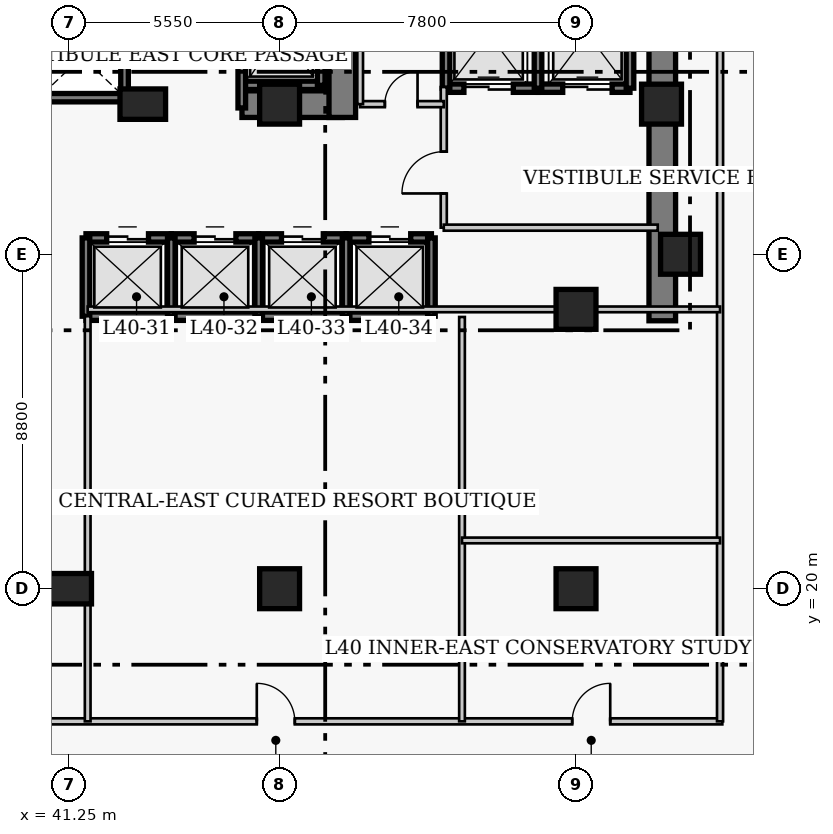
"""IFC4 building model, lengths in metres.
Left out: names, types, materials, properties, quantities, classifications, styles, units other than length and angle.
Written with IfcOpenShell. Run it as: python <this file> out.ifc"""

import sys

from ifc_helpers import new_model, si_unit, direction, frame, frame_2d, origin, origin_2d, place, context, subcontext, project, spatial, rectangle, extrude, element, fill, save


model = new_model("IFC4")
c1 = context("Model", 3, precision=1e-05, world=origin(), true_north=direction((0.0, 1.0)))
c2 = subcontext(c1, "Body", "Model", "MODEL_VIEW")
j1 = project(units=[si_unit("LENGTHUNIT", "METRE"), si_unit("PLANEANGLEUNIT", "RADIAN")], contexts=[c1])
p1 = place(None, origin())
s1 = spatial("IfcSite", under=j1, at=p1, CompositionType="ELEMENT")
p2 = place(p1, origin())
s2 = spatial("IfcBuilding", under=s1, at=p2, CompositionType="ELEMENT")
p3 = place(p2, frame((0.0, 0.0, 161.2)))
s3 = spatial("IfcBuildingStorey", under=s2, at=p3, CompositionType="ELEMENT", Elevation=161.2)
p4 = place(p3, frame((56.87, 27.05, 0.0), z_axis=(0.0, 0.0, 1.0), x_axis=(0.0, 1.0, 0.0)))
e1 = element("IfcWall", 1, at=p4, inside=s3, PredefinedType="SHEAR", context=c2, shape_type="SweptSolid", body=[
    extrude(rectangle(XDim=13.62, YDim=0.7, at=frame_2d((6.81, 0.0))), origin(), (0.0, 0.0, 1.0), 3.8),
])
p5 = place(p3, frame((45.81, 32.75, 0.0), z_axis=(0.0, 0.0, 1.0), x_axis=(1.0, 0.0, 0.0)))
e2 = element("IfcWall", 2, at=p5, inside=s3, PredefinedType="SHEAR", context=c2, shape_type="SweptSolid", body=[
    extrude(rectangle(XDim=2.64, YDim=0.7, at=frame_2d((1.32, 0.0))), origin(), (0.0, 0.0, 1.0), 3.8),
])
p6 = place(p3, frame((48.45, 32.4, 0.0), z_axis=(0.0, 0.0, 1.0), x_axis=(0.0, 1.0, 0.0)))
e3 = element("IfcWall", 3, at=p6, inside=s3, PredefinedType="SHEAR", context=c2, shape_type="SweptSolid", body=[
    extrude(rectangle(XDim=7.92, YDim=0.7, at=frame_2d((3.96, 0.0))), origin(), (0.0, 0.0, 1.0), 3.8),
])
p7 = place(p6, frame((5.8, 0.0, 0.0)))
e4 = element("IfcOpeningElement", 4, at=p7, cuts=e3, PredefinedType="OPENING", context=c2, shape_type="SweptSolid", body=[
    extrude(rectangle(XDim=1.1, YDim=2.15, at=frame_2d((0.55, 1.075))), frame((0.0, 0.36, 0.0), z_axis=(0.0, -1.0, 0.0), x_axis=(1.0, 0.0, 0.0)), (0.0, 0.0, 1.0), 0.72),
])
p8 = place(p3, frame((41.25, 20.0, 0.0), z_axis=(0.0, 0.0, 1.0), x_axis=(1.0, 0.0, 0.0)))
e5 = element("IfcColumn", 5, at=p8, inside=s3, PredefinedType="COLUMN", context=c2, shape_type="SweptSolid", body=[
    extrude(rectangle(XDim=1.2, YDim=0.8, at=origin_2d()), origin(), (0.0, 0.0, 1.0), 3.8),
])
for number, where, z_axis, x_axis in (
    (6, (46.8, 20.0, 0.0), (0.0, 0.0, 1.0), (1.0, 0.0, 0.0)),
    (7, (54.6, 20.0, 0.0), (0.0, 0.0, 1.0), (1.0, 0.0, 0.0)),
    (8, (57.35, 28.8, 0.0), (0.0, 0.0, 1.0), (1.0, 0.0, 0.0)),
):
    element("IfcColumn", number, at=place(p3, frame(where, z_axis=z_axis, x_axis=x_axis)), inside=s3, PredefinedType="COLUMN", context=c2, shape_type="SweptSolid", body=[
        extrude(rectangle(XDim=1.05, YDim=1.05, at=origin_2d()), origin(), (0.0, 0.0, 1.0), 3.8),
    ])
p9 = place(p3, frame((43.2, 32.75, 0.0), z_axis=(0.0, 0.0, 1.0), x_axis=(1.0, 0.0, 0.0)))
e9 = element("IfcColumn", 9, at=p9, inside=s3, PredefinedType="COLUMN", context=c2, shape_type="SweptSolid", body=[
    extrude(rectangle(XDim=1.2, YDim=0.8, at=origin_2d()), origin(), (0.0, 0.0, 1.0), 3.8),
])
for number, where, z_axis, x_axis in (
    (10, (46.8, 32.75, 0.0), (0.0, 0.0, 1.0), (1.0, 0.0, 0.0)),
    (11, (54.6, 27.35, 0.0), (0.0, 0.0, 1.0), (1.0, 0.0, 0.0)),
    (12, (56.85, 32.75, 0.0), (0.0, 0.0, 1.0), (1.0, 0.0, 0.0)),
):
    element("IfcColumn", number, at=place(p3, frame(where, z_axis=z_axis, x_axis=x_axis)), inside=s3, PredefinedType="COLUMN", context=c2, shape_type="SweptSolid", body=[
        extrude(rectangle(XDim=1.05, YDim=1.05, at=origin_2d()), origin(), (0.0, 0.0, 1.0), 3.8),
    ])
p10 = place(p3, frame((41.705, 29.23, 0.0), z_axis=(0.0, 0.0, 1.0), x_axis=(1.0, 0.0, 0.0)))
e13 = element("IfcWall", 13, at=p10, inside=s3, PredefinedType="SHEAR", context=c2, shape_type="SweptSolid", body=[
    extrude(rectangle(XDim=2.245, YDim=0.22, at=frame_2d((1.123, 0.0))), origin(), (0.0, 0.0, 1.0), 3.8),
])
p11 = place(p10, frame((0.545, 0.0, 0.0)))
e14 = element("IfcOpeningElement", 14, at=p11, cuts=e13, PredefinedType="OPENING", context=c2, shape_type="SweptSolid", body=[
    extrude(rectangle(XDim=1.1, YDim=2.15, at=frame_2d((0.55, 1.075))), frame((0.0, 0.12, 0.0), z_axis=(0.0, -1.0, 0.0), x_axis=(1.0, 0.0, 0.0)), (0.0, 0.0, 1.0), 0.24),
])
p12 = place(p3, frame((41.705, 27.17, 0.0), z_axis=(0.0, 0.0, 1.0), x_axis=(1.0, 0.0, 0.0)))
e15 = element("IfcWall", 15, at=p12, inside=s3, PredefinedType="SHEAR", context=c2, shape_type="SweptSolid", body=[
    extrude(rectangle(XDim=2.245, YDim=0.22, at=frame_2d((1.123, 0.0))), origin(), (0.0, 0.0, 1.0), 3.8),
])
p13 = place(p3, frame((41.705, 27.17, 0.0), z_axis=(0.0, 0.0, 1.0), x_axis=(0.0, 1.0, 0.0)))
e16 = element("IfcWall", 16, at=p13, inside=s3, PredefinedType="SHEAR", context=c2, shape_type="SweptSolid", body=[
    extrude(rectangle(XDim=2.06, YDim=0.2, at=frame_2d((1.03, 0.0))), origin(), (0.0, 0.0, 1.0), 3.8),
])
p14 = place(p3, frame((43.95, 29.23, 0.0), z_axis=(0.0, 0.0, 1.0), x_axis=(1.0, 0.0, 0.0)))
e17 = element("IfcWall", 17, at=p14, inside=s3, PredefinedType="SHEAR", context=c2, shape_type="SweptSolid", body=[
    extrude(rectangle(XDim=2.3, YDim=0.22, at=frame_2d((1.15, 0.0))), origin(), (0.0, 0.0, 1.0), 3.8),
])
p15 = place(p14, frame((0.6, 0.0, 0.0)))
e18 = element("IfcOpeningElement", 18, at=p15, cuts=e17, PredefinedType="OPENING", context=c2, shape_type="SweptSolid", body=[
    extrude(rectangle(XDim=1.1, YDim=2.15, at=frame_2d((0.55, 1.075))), frame((0.0, 0.12, 0.0), z_axis=(0.0, -1.0, 0.0), x_axis=(1.0, 0.0, 0.0)), (0.0, 0.0, 1.0), 0.24),
])
p16 = place(p3, frame((43.95, 27.17, 0.0), z_axis=(0.0, 0.0, 1.0), x_axis=(1.0, 0.0, 0.0)))
e19 = element("IfcWall", 19, at=p16, inside=s3, PredefinedType="SHEAR", context=c2, shape_type="SweptSolid", body=[
    extrude(rectangle(XDim=2.3, YDim=0.22, at=frame_2d((1.15, 0.0))), origin(), (0.0, 0.0, 1.0), 3.8),
])
p17 = place(p3, frame((43.95, 27.17, 0.0), z_axis=(0.0, 0.0, 1.0), x_axis=(0.0, 1.0, 0.0)))
e20 = element("IfcWall", 20, at=p17, inside=s3, PredefinedType="SHEAR", context=c2, shape_type="SweptSolid", body=[
    extrude(rectangle(XDim=2.06, YDim=0.2, at=frame_2d((1.03, 0.0))), origin(), (0.0, 0.0, 1.0), 3.8),
])
p18 = place(p3, frame((46.25, 29.23, 0.0), z_axis=(0.0, 0.0, 1.0), x_axis=(1.0, 0.0, 0.0)))
e21 = element("IfcWall", 21, at=p18, inside=s3, PredefinedType="SHEAR", context=c2, shape_type="SweptSolid", body=[
    extrude(rectangle(XDim=2.3, YDim=0.22, at=frame_2d((1.15, 0.0))), origin(), (0.0, 0.0, 1.0), 3.8),
])
p19 = place(p18, frame((0.6, 0.0, 0.0)))
e22 = element("IfcOpeningElement", 22, at=p19, cuts=e21, PredefinedType="OPENING", context=c2, shape_type="SweptSolid", body=[
    extrude(rectangle(XDim=1.1, YDim=2.15, at=frame_2d((0.55, 1.075))), frame((0.0, 0.12, 0.0), z_axis=(0.0, -1.0, 0.0), x_axis=(1.0, 0.0, 0.0)), (0.0, 0.0, 1.0), 0.24),
])
p20 = place(p3, frame((46.25, 27.17, 0.0), z_axis=(0.0, 0.0, 1.0), x_axis=(1.0, 0.0, 0.0)))
e23 = element("IfcWall", 23, at=p20, inside=s3, PredefinedType="SHEAR", context=c2, shape_type="SweptSolid", body=[
    extrude(rectangle(XDim=2.3, YDim=0.22, at=frame_2d((1.15, 0.0))), origin(), (0.0, 0.0, 1.0), 3.8),
])
p21 = place(p3, frame((46.25, 27.17, 0.0), z_axis=(0.0, 0.0, 1.0), x_axis=(0.0, 1.0, 0.0)))
e24 = element("IfcWall", 24, at=p21, inside=s3, PredefinedType="SHEAR", context=c2, shape_type="SweptSolid", body=[
    extrude(rectangle(XDim=2.06, YDim=0.2, at=frame_2d((1.03, 0.0))), origin(), (0.0, 0.0, 1.0), 3.8),
])
p22 = place(p3, frame((48.55, 29.23, 0.0), z_axis=(0.0, 0.0, 1.0), x_axis=(1.0, 0.0, 0.0)))
e25 = element("IfcWall", 25, at=p22, inside=s3, PredefinedType="SHEAR", context=c2, shape_type="SweptSolid", body=[
    extrude(rectangle(XDim=2.245, YDim=0.22, at=frame_2d((1.123, 0.0))), origin(), (0.0, 0.0, 1.0), 3.8),
])
p23 = place(p22, frame((0.6, 0.0, 0.0)))
e26 = element("IfcOpeningElement", 26, at=p23, cuts=e25, PredefinedType="OPENING", context=c2, shape_type="SweptSolid", body=[
    extrude(rectangle(XDim=1.1, YDim=2.15, at=frame_2d((0.55, 1.075))), frame((0.0, 0.12, 0.0), z_axis=(0.0, -1.0, 0.0), x_axis=(1.0, 0.0, 0.0)), (0.0, 0.0, 1.0), 0.24),
])
p24 = place(p3, frame((48.55, 27.17, 0.0), z_axis=(0.0, 0.0, 1.0), x_axis=(1.0, 0.0, 0.0)))
e27 = element("IfcWall", 27, at=p24, inside=s3, PredefinedType="SHEAR", context=c2, shape_type="SweptSolid", body=[
    extrude(rectangle(XDim=2.245, YDim=0.22, at=frame_2d((1.123, 0.0))), origin(), (0.0, 0.0, 1.0), 3.8),
])
for number, where, z_axis, x_axis in (
    (28, (48.55, 27.17, 0.0), (0.0, 0.0, 1.0), (0.0, 1.0, 0.0)),
    (29, (50.795, 27.17, 0.0), (0.0, 0.0, 1.0), (0.0, 1.0, 0.0)),
):
    element("IfcWall", number, at=place(p3, frame(where, z_axis=z_axis, x_axis=x_axis)), inside=s3, PredefinedType="SHEAR", context=c2, shape_type="SweptSolid", body=[
        extrude(rectangle(XDim=2.06, YDim=0.2, at=frame_2d((1.03, 0.0))), origin(), (0.0, 0.0, 1.0), 3.8),
    ])
p25 = place(p3, frame((40.4, 32.92, 0.0), z_axis=(0.0, 0.0, 1.0), x_axis=(1.0, 0.0, 0.0)))
e30 = element("IfcWall", 30, at=p25, inside=s3, PredefinedType="SHEAR", context=c2, shape_type="SweptSolid", body=[
    extrude(rectangle(XDim=2.32, YDim=0.22, at=frame_2d((1.16, 0.0))), origin(), (0.0, 0.0, 1.0), 3.8),
])
p26 = place(p3, frame((42.72, 32.92, 0.0), z_axis=(0.0, 0.0, 1.0), x_axis=(0.0, 1.0, 0.0)))
e31 = element("IfcWall", 31, at=p26, inside=s3, PredefinedType="SHEAR", context=c2, shape_type="SweptSolid", body=[
    extrude(rectangle(XDim=2.16, YDim=0.2, at=frame_2d((1.08, 0.0))), origin(), (0.0, 0.0, 1.0), 3.8),
])
p27 = place(p3, frame((51.18, 33.17, 0.0), z_axis=(0.0, 0.0, 1.0), x_axis=(1.0, 0.0, 0.0)))
e32 = element("IfcWall", 32, at=p27, inside=s3, PredefinedType="SHEAR", context=c2, shape_type="SweptSolid", body=[
    extrude(rectangle(XDim=2.42, YDim=0.22, at=frame_2d((1.21, 0.0))), origin(), (0.0, 0.0, 1.0), 3.8),
])
p28 = place(p27, frame((0.47, 0.0, 0.0)))
e33 = element("IfcOpeningElement", 33, at=p28, cuts=e32, PredefinedType="OPENING", context=c2, shape_type="SweptSolid", body=[
    extrude(rectangle(XDim=1.3, YDim=2.15, at=frame_2d((0.65, 1.075))), frame((0.0, 0.12, 0.0), z_axis=(0.0, -1.0, 0.0), x_axis=(1.0, 0.0, 0.0)), (0.0, 0.0, 1.0), 0.24),
])
p29 = place(p3, frame((51.18, 33.17, 0.0), z_axis=(0.0, 0.0, 1.0), x_axis=(0.0, 1.0, 0.0)))
e34 = element("IfcWall", 34, at=p29, inside=s3, PredefinedType="SHEAR", context=c2, shape_type="SweptSolid", body=[
    extrude(rectangle(XDim=2.86, YDim=0.2, at=frame_2d((1.43, 0.0))), origin(), (0.0, 0.0, 1.0), 3.8),
])
p30 = place(p3, frame((53.6, 33.17, 0.0), z_axis=(0.0, 0.0, 1.0), x_axis=(1.0, 0.0, 0.0)))
e35 = element("IfcWall", 35, at=p30, inside=s3, PredefinedType="SHEAR", context=c2, shape_type="SweptSolid", body=[
    extrude(rectangle(XDim=2.42, YDim=0.22, at=frame_2d((1.21, 0.0))), origin(), (0.0, 0.0, 1.0), 3.8),
])
p31 = place(p30, frame((0.65, 0.0, 0.0)))
e36 = element("IfcOpeningElement", 36, at=p31, cuts=e35, PredefinedType="OPENING", context=c2, shape_type="SweptSolid", body=[
    extrude(rectangle(XDim=1.3, YDim=2.15, at=frame_2d((0.65, 1.075))), frame((0.0, 0.12, 0.0), z_axis=(0.0, -1.0, 0.0), x_axis=(1.0, 0.0, 0.0)), (0.0, 0.0, 1.0), 0.24),
])
for number, where, z_axis, x_axis in (
    (37, (53.6, 33.17, 0.0), (0.0, 0.0, 1.0), (0.0, 1.0, 0.0)),
    (38, (56.02, 33.17, 0.0), (0.0, 0.0, 1.0), (0.0, 1.0, 0.0)),
):
    element("IfcWall", number, at=place(p3, frame(where, z_axis=z_axis, x_axis=x_axis)), inside=s3, PredefinedType="SHEAR", context=c2, shape_type="SweptSolid", body=[
        extrude(rectangle(XDim=2.86, YDim=0.2, at=frame_2d((1.43, 0.0))), origin(), (0.0, 0.0, 1.0), 3.8),
    ])
p32 = place(p3, frame((45.805, 33.245, 0.0), z_axis=(0.0, 0.0, 1.0), x_axis=(1.0, 0.0, 0.0)))
e39 = element("IfcWall", 39, at=p32, inside=s3, PredefinedType="SHEAR", context=c2, shape_type="SweptSolid", body=[
    extrude(rectangle(XDim=2.09, YDim=0.22, at=frame_2d((1.045, 0.0))), origin(), (0.0, 0.0, 1.0), 3.8),
])
p33 = place(p3, frame((45.805, 32.65, 0.0), z_axis=(0.0, 0.0, 1.0), x_axis=(0.0, 1.0, 0.0)))
e40 = element("IfcWall", 40, at=p33, inside=s3, PredefinedType="SHEAR", context=c2, shape_type="SweptSolid", body=[
    extrude(rectangle(XDim=3.505, YDim=0.2, at=frame_2d((1.752, 0.0))), origin(), (0.0, 0.0, 1.0), 3.8),
])
p34 = place(p3, frame((47.895, 33.245, 0.0), z_axis=(0.0, 0.0, 1.0), x_axis=(0.0, 1.0, 0.0)))
e41 = element("IfcWall", 41, at=p34, inside=s3, PredefinedType="SHEAR", context=c2, shape_type="SweptSolid", body=[
    extrude(rectangle(XDim=2.91, YDim=0.2, at=frame_2d((1.455, 0.0))), origin(), (0.0, 0.0, 1.0), 3.8),
])
p35 = place(p3, frame((51.12, 29.5, 0.0), z_axis=(0.0, 0.0, 1.0), x_axis=(0.0, 1.0, 0.0)))
e42 = element("IfcWall", 42, at=p35, inside=s3, PredefinedType="PARTITIONING", context=c2, shape_type="SweptSolid", body=[
    extrude(rectangle(XDim=3.7, YDim=0.16, at=frame_2d((1.85, 0.0))), origin(), (0.0, 0.0, 1.0), 3.55),
])
p36 = place(p35, frame((0.9, 0.0, 0.0)))
e43 = element("IfcOpeningElement", 43, at=p36, cuts=e42, PredefinedType="OPENING", context=c2, shape_type="SweptSolid", body=[
    extrude(rectangle(XDim=1.1, YDim=2.15, at=frame_2d((0.55, 1.075))), frame((0.0, 0.09, 0.0), z_axis=(0.0, -1.0, 0.0), x_axis=(1.0, 0.0, 0.0)), (0.0, 0.0, 1.0), 0.18),
])
p37 = place(p3, frame((51.12, 29.5, 0.0), z_axis=(0.0, 0.0, 1.0), x_axis=(1.0, 0.0, 0.0)))
e44 = element("IfcWall", 44, at=p37, inside=s3, PredefinedType="PARTITIONING", context=c2, shape_type="SweptSolid", body=[
    extrude(rectangle(XDim=5.63, YDim=0.16, at=frame_2d((2.815, 0.0))), origin(), (0.0, 0.0, 1.0), 3.55),
])
p38 = place(p3, frame((48.92, 32.75, 0.0), z_axis=(0.0, 0.0, 1.0), x_axis=(1.0, 0.0, 0.0)))
e45 = element("IfcWall", 45, at=p38, inside=s3, PredefinedType="PARTITIONING", context=c2, shape_type="SweptSolid", body=[
    extrude(rectangle(XDim=2.2, YDim=0.16, at=frame_2d((1.1, 0.0))), origin(), (0.0, 0.0, 1.0), 3.55),
])
p39 = place(p38, frame((0.65, 0.0, 0.0)))
e46 = element("IfcOpeningElement", 46, at=p39, cuts=e45, PredefinedType="OPENING", context=c2, shape_type="SweptSolid", body=[
    extrude(rectangle(XDim=0.86, YDim=2.05, at=frame_2d((0.43, 1.025))), frame((0.0, 0.09, 0.0), z_axis=(0.0, -1.0, 0.0), x_axis=(1.0, 0.0, 0.0)), (0.0, 0.0, 1.0), 0.18),
])
p40 = place(p3, frame((48.92, 32.75, 0.0), z_axis=(0.0, 0.0, 1.0), x_axis=(0.0, 1.0, 0.0)))
e47 = element("IfcWall", 47, at=p40, inside=s3, PredefinedType="PARTITIONING", context=c2, shape_type="SweptSolid", body=[
    extrude(rectangle(XDim=3.62, YDim=0.15, at=frame_2d((1.81, 0.0))), origin(), (0.0, 0.0, 1.0), 3.55),
])
p41 = place(p3, frame((35.85, 16.51, 0.0), z_axis=(0.0, 0.0, 1.0), x_axis=(1.0, 0.0, 0.0)))
e48 = element("IfcWall", 48, at=p41, inside=s3, PredefinedType="PARTITIONING", context=c2, shape_type="SweptSolid", body=[
    extrude(rectangle(XDim=22.6, YDim=0.16, at=frame_2d((11.3, 0.0))), origin(), (0.0, 0.0, 1.0), 3.55),
])
p42 = place(p41, frame((10.35, 0.0, 0.0)))
e49 = element("IfcOpeningElement", 49, at=p42, cuts=e48, PredefinedType="OPENING", context=c2, shape_type="SweptSolid", body=[
    extrude(rectangle(XDim=1.0, YDim=2.15, at=frame_2d((0.5, 1.075))), frame((0.0, 0.09, 0.0), z_axis=(0.0, -1.0, 0.0), x_axis=(1.0, 0.0, 0.0)), (0.0, 0.0, 1.0), 0.18),
])
p43 = place(p41, frame((18.65, 0.0, 0.0)))
e50 = element("IfcOpeningElement", 50, at=p43, cuts=e48, PredefinedType="OPENING", context=c2, shape_type="SweptSolid", body=[
    extrude(rectangle(XDim=1.0, YDim=2.15, at=frame_2d((0.5, 1.075))), frame((0.0, 0.09, 0.0), z_axis=(0.0, -1.0, 0.0), x_axis=(1.0, 0.0, 0.0)), (0.0, 0.0, 1.0), 0.18),
])
p44 = place(p3, frame((58.39, 16.51, 0.0), z_axis=(0.0, 0.0, 1.0), x_axis=(0.0, 1.0, 0.0)))
e51 = element("IfcWall", 51, at=p44, inside=s3, PredefinedType="PARTITIONING", context=c2, shape_type="SweptSolid", body=[
    extrude(rectangle(XDim=24.14, YDim=0.16, at=frame_2d((12.07, 0.0))), origin(), (0.0, 0.0, 1.0), 3.093),
])
p45 = place(p3, frame((41.75, 16.51, 0.0), z_axis=(0.0, 0.0, 1.0), x_axis=(0.0, 1.0, 0.0)))
e52 = element("IfcWall", 52, at=p45, inside=s3, PredefinedType="PARTITIONING", context=c2, shape_type="SweptSolid", body=[
    extrude(rectangle(XDim=10.66, YDim=0.15, at=frame_2d((5.33, 0.0))), origin(), (0.0, 0.0, 1.0), 3.55),
])
p46 = place(p3, frame((51.6, 16.51, 0.0), z_axis=(0.0, 0.0, 1.0), x_axis=(0.0, 1.0, 0.0)))
e53 = element("IfcWall", 53, at=p46, inside=s3, PredefinedType="PARTITIONING", context=c2, shape_type="SweptSolid", body=[
    extrude(rectangle(XDim=10.64, YDim=0.15, at=frame_2d((5.32, 0.0))), origin(), (0.0, 0.0, 1.0), 3.55),
])
p47 = place(p3, frame((41.75, 27.35, 0.0), z_axis=(0.0, 0.0, 1.0), x_axis=(1.0, 0.0, 0.0)))
e54 = element("IfcWall", 54, at=p47, inside=s3, PredefinedType="PARTITIONING", context=c2, shape_type="SweptSolid", body=[
    extrude(rectangle(XDim=16.64, YDim=0.15, at=frame_2d((8.32, 0.0))), origin(), (0.0, 0.0, 1.0), 3.55),
])
p48 = place(p3, frame((51.6, 21.27, 0.0), z_axis=(0.0, 0.0, 1.0), x_axis=(1.0, 0.0, 0.0)))
e55 = element("IfcWall", 55, at=p48, inside=s3, PredefinedType="PARTITIONING", context=c2, shape_type="SweptSolid", body=[
    extrude(rectangle(XDim=6.79, YDim=0.15, at=frame_2d((3.395, 0.0))), origin(), (0.0, 0.0, 1.0), 3.55),
])
p49 = place(p11, origin())
e56 = element("IfcDoor", 56, at=p49, inside=s3, OperationType="DOUBLE_DOOR_SLIDING", PredefinedType="DOOR", context=c2, shape_type="SweptSolid", body=[
    extrude(rectangle(XDim=1.1, YDim=2.15, at=frame_2d((0.55, 1.075))), frame((0.0, 0.025, 0.0), z_axis=(0.0, -1.0, 0.0), x_axis=(1.0, 0.0, 0.0)), (0.0, 0.0, 1.0), 0.05),
])
fill(e14, e56)
p50 = place(p15, origin())
e57 = element("IfcDoor", 57, at=p50, inside=s3, OperationType="DOUBLE_DOOR_SLIDING", PredefinedType="DOOR", context=c2, shape_type="SweptSolid", body=[
    extrude(rectangle(XDim=1.1, YDim=2.15, at=frame_2d((0.55, 1.075))), frame((0.0, 0.025, 0.0), z_axis=(0.0, -1.0, 0.0), x_axis=(1.0, 0.0, 0.0)), (0.0, 0.0, 1.0), 0.05),
])
fill(e18, e57)
p51 = place(p19, origin())
e58 = element("IfcDoor", 58, at=p51, inside=s3, OperationType="DOUBLE_DOOR_SLIDING", PredefinedType="DOOR", context=c2, shape_type="SweptSolid", body=[
    extrude(rectangle(XDim=1.1, YDim=2.15, at=frame_2d((0.55, 1.075))), frame((0.0, 0.025, 0.0), z_axis=(0.0, -1.0, 0.0), x_axis=(1.0, 0.0, 0.0)), (0.0, 0.0, 1.0), 0.05),
])
fill(e22, e58)
p52 = place(p23, origin())
e59 = element("IfcDoor", 59, at=p52, inside=s3, OperationType="DOUBLE_DOOR_SLIDING", PredefinedType="DOOR", context=c2, shape_type="SweptSolid", body=[
    extrude(rectangle(XDim=1.1, YDim=2.15, at=frame_2d((0.55, 1.075))), frame((0.0, 0.025, 0.0), z_axis=(0.0, -1.0, 0.0), x_axis=(1.0, 0.0, 0.0)), (0.0, 0.0, 1.0), 0.05),
])
fill(e26, e59)
p53 = place(p28, origin())
e60 = element("IfcDoor", 60, at=p53, inside=s3, OperationType="DOUBLE_DOOR_SLIDING", PredefinedType="DOOR", context=c2, shape_type="SweptSolid", body=[
    extrude(rectangle(XDim=1.3, YDim=2.15, at=frame_2d((0.65, 1.075))), frame((0.0, 0.025, 0.0), z_axis=(0.0, -1.0, 0.0), x_axis=(1.0, 0.0, 0.0)), (0.0, 0.0, 1.0), 0.05),
])
fill(e33, e60)
p54 = place(p31, origin())
e61 = element("IfcDoor", 61, at=p54, inside=s3, OperationType="DOUBLE_DOOR_SLIDING", PredefinedType="DOOR", context=c2, shape_type="SweptSolid", body=[
    extrude(rectangle(XDim=1.3, YDim=2.15, at=frame_2d((0.65, 1.075))), frame((0.0, 0.025, 0.0), z_axis=(0.0, -1.0, 0.0), x_axis=(1.0, 0.0, 0.0)), (0.0, 0.0, 1.0), 0.05),
])
fill(e36, e61)
p55 = place(p36, origin())
e62 = element("IfcDoor", 62, at=p55, inside=s3, OperationType="SINGLE_SWING_LEFT", PredefinedType="DOOR", context=c2, shape_type="SweptSolid", body=[
    extrude(rectangle(XDim=1.1, YDim=2.15, at=frame_2d((0.55, 1.075))), frame((0.0, 0.025, 0.0), z_axis=(0.0, -1.0, 0.0), x_axis=(1.0, 0.0, 0.0)), (0.0, 0.0, 1.0), 0.05),
])
fill(e43, e62)
p56 = place(p39, origin())
e63 = element("IfcDoor", 63, at=p56, inside=s3, OperationType="SINGLE_SWING_RIGHT", PredefinedType="DOOR", context=c2, shape_type="SweptSolid", body=[
    extrude(rectangle(XDim=0.86, YDim=2.05, at=frame_2d((0.43, 1.025))), frame((0.0, 0.025, 0.0), z_axis=(0.0, -1.0, 0.0), x_axis=(1.0, 0.0, 0.0)), (0.0, 0.0, 1.0), 0.05),
])
fill(e46, e63)
p57 = place(p42, origin())
e64 = element("IfcDoor", 64, at=p57, inside=s3, OperationType="SINGLE_SWING_LEFT", PredefinedType="DOOR", context=c2, shape_type="SweptSolid", body=[
    extrude(rectangle(XDim=1.0, YDim=2.15, at=frame_2d((0.5, 1.075))), frame((0.0, 0.025, 0.0), z_axis=(0.0, -1.0, 0.0), x_axis=(1.0, 0.0, 0.0)), (0.0, 0.0, 1.0), 0.05),
])
fill(e49, e64)
p58 = place(p43, origin())
e65 = element("IfcDoor", 65, at=p58, inside=s3, OperationType="SINGLE_SWING_RIGHT", PredefinedType="DOOR", context=c2, shape_type="SweptSolid", body=[
    extrude(rectangle(XDim=1.0, YDim=2.15, at=frame_2d((0.5, 1.075))), frame((0.0, 0.025, 0.0), z_axis=(0.0, -1.0, 0.0), x_axis=(1.0, 0.0, 0.0)), (0.0, 0.0, 1.0), 0.05),
])
fill(e50, e65)
save(model, sys.argv[1])
